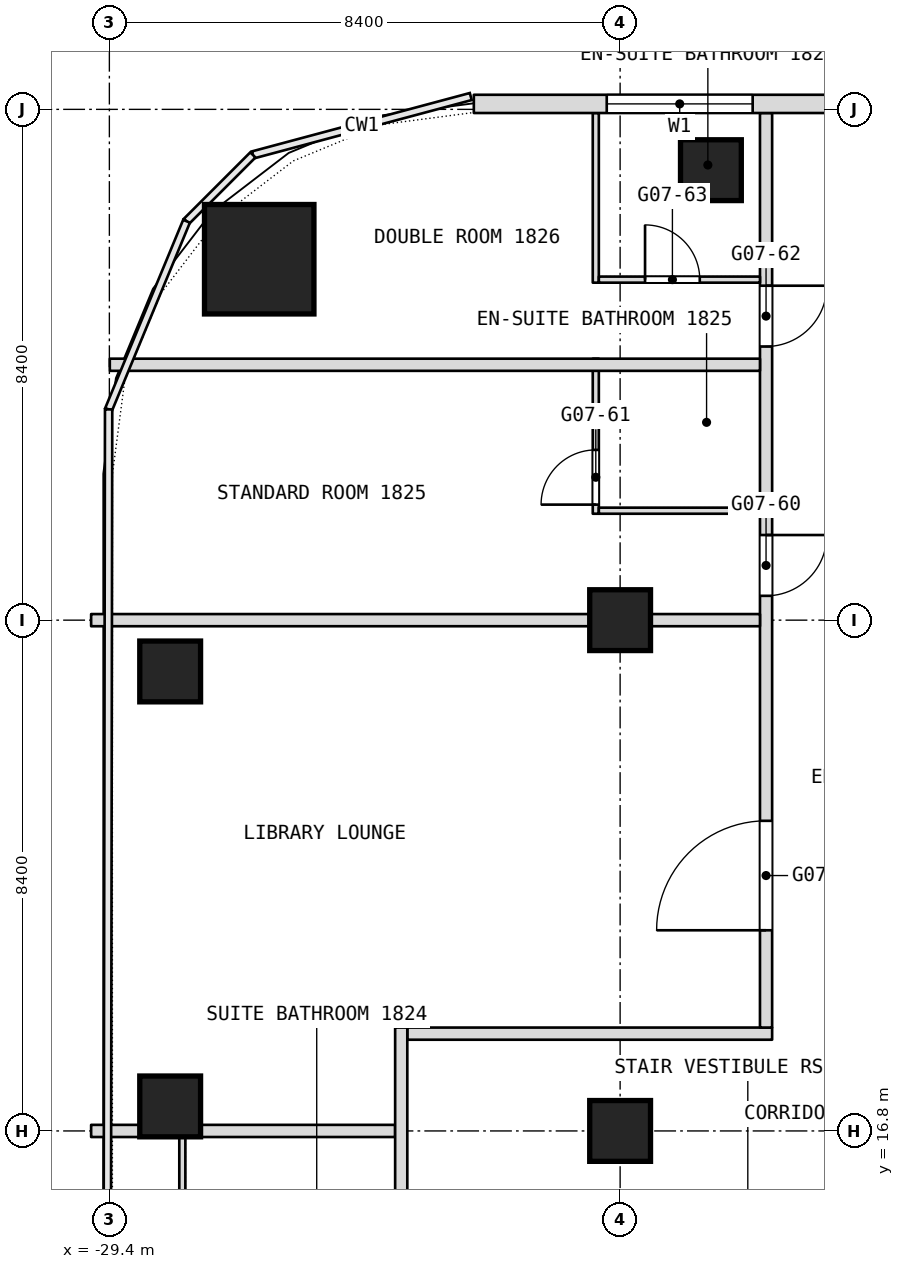
"""IFC4 building model, lengths in metres.
Left out: names, types, materials, properties, quantities, classifications, styles, units other than length and angle.
Written with IfcOpenShell. Run it as: python <this file> out.ifc"""

import sys

from ifc_helpers import new_model, si_unit, direction, frame, frame_2d, origin, origin_2d, place, context, subcontext, project, spatial, rectangle, extrude, element, fill, save


model = new_model("IFC4")
c1 = context("Model", 3, precision=1e-05, world=origin(), true_north=direction((0.0, 1.0)))
c2 = subcontext(c1, "Body", "Model", "MODEL_VIEW")
j1 = project(units=[si_unit("LENGTHUNIT", "METRE"), si_unit("PLANEANGLEUNIT", "RADIAN")], contexts=[c1])
p1 = place(None, origin())
s1 = spatial("IfcSite", under=j1, at=p1, CompositionType="ELEMENT")
p2 = place(p1, origin())
s2 = spatial("IfcBuilding", under=s1, at=p2, CompositionType="ELEMENT")
p3 = place(p2, frame((0.0, 0.0, 79.7)))
s3 = spatial("IfcBuildingStorey", under=s2, at=p3, CompositionType="ELEMENT", Elevation=79.7)
p4 = place(p3, frame((-26.936, 31.135, 0.0), z_axis=(0.0, 0.0, 1.0), x_axis=(1.0, 0.0, 0.0)))
e1 = element("IfcColumn", 1, at=p4, inside=s3, PredefinedType="COLUMN", context=c2, shape_type="SweptSolid", body=[
    extrude(rectangle(XDim=1.8, YDim=1.8, at=origin_2d()), origin(), (0.0, 0.0, 1.0), 3.6),
])
for number, where, z_axis, x_axis in (
    (2, (-21.0, 16.8, 0.0), (0.0, 0.0, 1.0), (1.0, 0.0, 0.0)),
    (3, (-21.0, 25.2, 0.0), (0.0, 0.0, 1.0), (1.0, 0.0, 0.0)),
    (4, (-28.4, 17.203, 0.0), (0.0, 0.0, 1.0), (1.0, 0.0, 0.0)),
    (5, (-28.4, 24.356, 0.0), (0.0, 0.0, 1.0), (1.0, 0.0, 0.0)),
    (6, (-19.507, 32.6, 0.0), (0.0, 0.0, 1.0), (1.0, 0.0, 0.0)),
):
    element("IfcColumn", number, at=place(p3, frame(where, z_axis=z_axis, x_axis=x_axis)), inside=s3, PredefinedType="COLUMN", context=c2, shape_type="SweptSolid", body=[
        extrude(rectangle(XDim=1.0, YDim=1.0, at=origin_2d()), origin(), (0.0, 0.0, 1.0), 3.6),
    ])
p5 = place(p3, frame((-29.7, 16.8, 0.0), z_axis=(0.0, 0.0, 1.0), x_axis=(1.0, 0.0, 0.0)))
e7 = element("IfcWall", 7, at=p5, inside=s3, PredefinedType="PARTITIONING", context=c2, shape_type="SweptSolid", body=[
    extrude(rectangle(XDim=5.0, YDim=0.2, at=frame_2d((2.5, 0.0))), origin(), (0.0, 0.0, 1.0), 2.84),
])
p6 = place(p3, frame((-24.5, 18.4, 0.0), z_axis=(0.0, 0.0, 1.0), x_axis=(1.0, 0.0, 0.0)))
e8 = element("IfcWall", 8, at=p6, inside=s3, PredefinedType="PARTITIONING", context=c2, shape_type="SweptSolid", body=[
    extrude(rectangle(XDim=6.0, YDim=0.2, at=frame_2d((3.0, 0.0))), origin(), (0.0, 0.0, 1.0), 3.34),
])
p7 = place(p3, frame((-18.6, 18.5, 0.0), z_axis=(0.0, 0.0, 1.0), x_axis=(0.0, 1.0, 0.0)))
e9 = element("IfcWall", 9, at=p7, inside=s3, PredefinedType="PARTITIONING", context=c2, shape_type="SweptSolid", body=[
    extrude(rectangle(XDim=15.04, YDim=0.2, at=frame_2d((7.52, 0.0))), origin(), (0.0, 0.0, 1.0), 3.34),
])
p8 = place(p7, frame((1.6, 0.0, 0.0)))
e10 = element("IfcOpeningElement", 10, at=p8, cuts=e9, PredefinedType="OPENING", context=c2, shape_type="SweptSolid", body=[
    extrude(rectangle(XDim=1.8, YDim=2.1, at=frame_2d((0.9, 1.05))), frame((0.0, 0.1, 0.0), z_axis=(0.0, -1.0, 0.0), x_axis=(1.0, 0.0, 0.0)), (0.0, 0.0, 1.0), 0.2),
])
p9 = place(p7, frame((7.1, 0.0, 0.0)))
e11 = element("IfcOpeningElement", 11, at=p9, cuts=e9, PredefinedType="OPENING", context=c2, shape_type="SweptSolid", body=[
    extrude(rectangle(XDim=1.0, YDim=2.1, at=frame_2d((0.5, 1.05))), frame((0.0, 0.1, 0.0), z_axis=(0.0, -1.0, 0.0), x_axis=(1.0, 0.0, 0.0)), (0.0, 0.0, 1.0), 0.2),
])
p10 = place(p7, frame((11.2, 0.0, 0.0)))
e12 = element("IfcOpeningElement", 12, at=p10, cuts=e9, PredefinedType="OPENING", context=c2, shape_type="SweptSolid", body=[
    extrude(rectangle(XDim=1.0, YDim=2.1, at=frame_2d((0.5, 1.05))), frame((0.0, 0.1, 0.0), z_axis=(0.0, -1.0, 0.0), x_axis=(1.0, 0.0, 0.0)), (0.0, 0.0, 1.0), 0.2),
])
p11 = place(p3, frame((-21.4, 26.95, 0.0), z_axis=(0.0, 0.0, 1.0), x_axis=(0.0, 1.0, 0.0)))
e13 = element("IfcWall", 13, at=p11, inside=s3, PredefinedType="PARTITIONING", context=c2, shape_type="SweptSolid", body=[
    extrude(rectangle(XDim=2.55, YDim=0.1, at=frame_2d((1.275, 0.0))), origin(), (0.0, 0.0, 1.0), 3.34),
])
p12 = place(p11, frame((0.15, 0.0, 0.0)))
e14 = element("IfcOpeningElement", 14, at=p12, cuts=e13, PredefinedType="OPENING", context=c2, shape_type="SweptSolid", body=[
    extrude(rectangle(XDim=0.9, YDim=2.1, at=frame_2d((0.45, 1.05))), frame((0.0, 0.05, 0.0), z_axis=(0.0, -1.0, 0.0), x_axis=(1.0, 0.0, 0.0)), (0.0, 0.0, 1.0), 0.1),
])
p13 = place(p3, frame((-21.4, 30.75, 0.0), z_axis=(0.0, 0.0, 1.0), x_axis=(0.0, 1.0, 0.0)))
e15 = element("IfcWall", 15, at=p13, inside=s3, PredefinedType="PARTITIONING", context=c2, shape_type="SweptSolid", body=[
    extrude(rectangle(XDim=2.79, YDim=0.1, at=frame_2d((1.395, 0.0))), origin(), (0.0, 0.0, 1.0), 3.34),
])
p14 = place(p3, frame((-24.6, 6.9, 0.0), z_axis=(0.0, 0.0, 1.0), x_axis=(0.0, 1.0, 0.0)))
e16 = element("IfcWall", 16, at=p14, inside=s3, PredefinedType="PARTITIONING", context=c2, shape_type="SweptSolid", body=[
    extrude(rectangle(XDim=11.6, YDim=0.2, at=frame_2d((5.8, 0.0))), origin(), (0.0, 0.0, 1.0), 3.34),
])
p15 = place(p14, frame((5.1, 0.0, 0.0)))
e17 = element("IfcOpeningElement", 17, at=p15, cuts=e16, PredefinedType="OPENING", context=c2, shape_type="SweptSolid", body=[
    extrude(rectangle(XDim=1.1, YDim=2.1, at=frame_2d((0.55, 1.05))), frame((0.0, 0.1, 0.0), z_axis=(0.0, -1.0, 0.0), x_axis=(1.0, 0.0, 0.0)), (0.0, 0.0, 1.0), 0.2),
])
p16 = place(p3, frame((-29.7, 25.2, 0.0), z_axis=(0.0, 0.0, 1.0), x_axis=(1.0, 0.0, 0.0)))
e18 = element("IfcWall", 18, at=p16, inside=s3, PredefinedType="PARTITIONING", context=c2, shape_type="SweptSolid", body=[
    extrude(rectangle(XDim=11.0, YDim=0.2, at=frame_2d((5.5, 0.0))), origin(), (0.0, 0.0, 1.0), 2.84),
])
p17 = place(p3, frame((-21.35, 27.0, 0.0), z_axis=(0.0, 0.0, 1.0), x_axis=(1.0, 0.0, 0.0)))
e19 = element("IfcWall", 19, at=p17, inside=s3, PredefinedType="PARTITIONING", context=c2, shape_type="SweptSolid", body=[
    extrude(rectangle(XDim=2.65, YDim=0.1, at=frame_2d((1.325, 0.0))), origin(), (0.0, 0.0, 1.0), 3.34),
])
p18 = place(p3, frame((-28.2, 13.15, 0.0), z_axis=(0.0, 0.0, 1.0), x_axis=(0.0, 1.0, 0.0)))
e20 = element("IfcWall", 20, at=p18, inside=s3, PredefinedType="PARTITIONING", context=c2, shape_type="SweptSolid", body=[
    extrude(rectangle(XDim=3.75, YDim=0.1, at=frame_2d((1.875, 0.0))), origin(), (0.0, 0.0, 1.0), 2.94),
])
p19 = place(p3, frame((-29.393, 29.4, 0.0), z_axis=(0.0, 0.0, 1.0), x_axis=(1.0, 0.0, 0.0)))
e21 = element("IfcWall", 21, at=p19, inside=s3, PredefinedType="PARTITIONING", context=c2, shape_type="SweptSolid", body=[
    extrude(rectangle(XDim=10.693, YDim=0.2, at=frame_2d((5.347, 0.0))), origin(), (0.0, 0.0, 1.0), 3.34),
])
p20 = place(p3, frame((-21.35, 30.8, 0.0), z_axis=(0.0, 0.0, 1.0), x_axis=(1.0, 0.0, 0.0)))
e22 = element("IfcWall", 22, at=p20, inside=s3, PredefinedType="PARTITIONING", context=c2, shape_type="SweptSolid", body=[
    extrude(rectangle(XDim=2.65, YDim=0.1, at=frame_2d((1.325, 0.0))), origin(), (0.0, 0.0, 1.0), 3.34),
])
p21 = place(p20, frame((0.76, 0.0, 0.0)))
e23 = element("IfcOpeningElement", 23, at=p21, cuts=e22, PredefinedType="OPENING", context=c2, shape_type="SweptSolid", body=[
    extrude(rectangle(XDim=0.9, YDim=2.1, at=frame_2d((0.45, 1.05))), frame((0.0, 0.05, 0.0), z_axis=(0.0, -1.0, 0.0), x_axis=(1.0, 0.0, 0.0)), (0.0, 0.0, 1.0), 0.1),
])
p22 = place(p3, frame((23.406, 33.69, 0.0), z_axis=(0.0, 0.0, 1.0), x_axis=(-1.0, 0.0, 0.0)))
e24 = element("IfcWall", 24, at=p22, inside=s3, PredefinedType="NOTDEFINED", context=c2, shape_type="SweptSolid", body=[
    extrude(rectangle(XDim=46.812, YDim=0.3, at=frame_2d((23.406, 0.0))), origin(), (0.0, 0.0, 1.0), 3.6),
])
p23 = place(p22, frame((2.186, 0.0, 0.9)))
e25 = element("IfcOpeningElement", 25, at=p23, cuts=e24, PredefinedType="OPENING", context=c2, shape_type="SweptSolid", body=[
    extrude(rectangle(XDim=2.4, YDim=2.1, at=frame_2d((1.2, 1.05))), frame((0.0, 0.15, 0.0), z_axis=(0.0, -1.0, 0.0), x_axis=(1.0, 0.0, 0.0)), (0.0, 0.0, 1.0), 0.3),
])
p24 = place(p22, frame((7.506, 0.0, 0.9)))
e26 = element("IfcOpeningElement", 26, at=p24, cuts=e24, PredefinedType="OPENING", context=c2, shape_type="SweptSolid", body=[
    extrude(rectangle(XDim=2.4, YDim=2.1, at=frame_2d((1.2, 1.05))), frame((0.0, 0.15, 0.0), z_axis=(0.0, -1.0, 0.0), x_axis=(1.0, 0.0, 0.0)), (0.0, 0.0, 1.0), 0.3),
])
p25 = place(p22, frame((11.706, 0.0, 0.9)))
e27 = element("IfcOpeningElement", 27, at=p25, cuts=e24, PredefinedType="OPENING", context=c2, shape_type="SweptSolid", body=[
    extrude(rectangle(XDim=2.4, YDim=2.1, at=frame_2d((1.2, 1.05))), frame((0.0, 0.15, 0.0), z_axis=(0.0, -1.0, 0.0), x_axis=(1.0, 0.0, 0.0)), (0.0, 0.0, 1.0), 0.3),
])
p26 = place(p22, frame((15.906, 0.0, 0.9)))
e28 = element("IfcOpeningElement", 28, at=p26, cuts=e24, PredefinedType="OPENING", context=c2, shape_type="SweptSolid", body=[
    extrude(rectangle(XDim=2.4, YDim=2.1, at=frame_2d((1.2, 1.05))), frame((0.0, 0.15, 0.0), z_axis=(0.0, -1.0, 0.0), x_axis=(1.0, 0.0, 0.0)), (0.0, 0.0, 1.0), 0.3),
])
p27 = place(p22, frame((20.106, 0.0, 0.9)))
e29 = element("IfcOpeningElement", 29, at=p27, cuts=e24, PredefinedType="OPENING", context=c2, shape_type="SweptSolid", body=[
    extrude(rectangle(XDim=2.4, YDim=2.1, at=frame_2d((1.2, 1.05))), frame((0.0, 0.15, 0.0), z_axis=(0.0, -1.0, 0.0), x_axis=(1.0, 0.0, 0.0)), (0.0, 0.0, 1.0), 0.3),
])
p28 = place(p22, frame((24.306, 0.0, 0.9)))
e30 = element("IfcOpeningElement", 30, at=p28, cuts=e24, PredefinedType="OPENING", context=c2, shape_type="SweptSolid", body=[
    extrude(rectangle(XDim=2.4, YDim=2.1, at=frame_2d((1.2, 1.05))), frame((0.0, 0.15, 0.0), z_axis=(0.0, -1.0, 0.0), x_axis=(1.0, 0.0, 0.0)), (0.0, 0.0, 1.0), 0.3),
])
p29 = place(p22, frame((28.506, 0.0, 0.9)))
e31 = element("IfcOpeningElement", 31, at=p29, cuts=e24, PredefinedType="OPENING", context=c2, shape_type="SweptSolid", body=[
    extrude(rectangle(XDim=2.4, YDim=2.1, at=frame_2d((1.2, 1.05))), frame((0.0, 0.15, 0.0), z_axis=(0.0, -1.0, 0.0), x_axis=(1.0, 0.0, 0.0)), (0.0, 0.0, 1.0), 0.3),
])
p30 = place(p22, frame((32.706, 0.0, 0.9)))
e32 = element("IfcOpeningElement", 32, at=p30, cuts=e24, PredefinedType="OPENING", context=c2, shape_type="SweptSolid", body=[
    extrude(rectangle(XDim=2.4, YDim=2.1, at=frame_2d((1.2, 1.05))), frame((0.0, 0.15, 0.0), z_axis=(0.0, -1.0, 0.0), x_axis=(1.0, 0.0, 0.0)), (0.0, 0.0, 1.0), 0.3),
])
p31 = place(p22, frame((36.906, 0.0, 0.9)))
e33 = element("IfcOpeningElement", 33, at=p31, cuts=e24, PredefinedType="OPENING", context=c2, shape_type="SweptSolid", body=[
    extrude(rectangle(XDim=2.4, YDim=2.1, at=frame_2d((1.2, 1.05))), frame((0.0, 0.15, 0.0), z_axis=(0.0, -1.0, 0.0), x_axis=(1.0, 0.0, 0.0)), (0.0, 0.0, 1.0), 0.3),
])
p32 = place(p22, frame((42.226, 0.0, 0.9)))
e34 = element("IfcOpeningElement", 34, at=p32, cuts=e24, PredefinedType="OPENING", context=c2, shape_type="SweptSolid", body=[
    extrude(rectangle(XDim=2.4, YDim=2.1, at=frame_2d((1.2, 1.05))), frame((0.0, 0.15, 0.0), z_axis=(0.0, -1.0, 0.0), x_axis=(1.0, 0.0, 0.0)), (0.0, 0.0, 1.0), 0.3),
])
p33 = place(p8, origin())
e35 = element("IfcDoor", 35, at=p33, inside=s3, OperationType="DOUBLE_DOOR_SINGLE_SWING", PredefinedType="DOOR", context=c2, shape_type="SweptSolid", body=[
    extrude(rectangle(XDim=1.8, YDim=2.1, at=frame_2d((0.9, 1.05))), frame((0.0, 0.025, 0.0), z_axis=(0.0, -1.0, 0.0), x_axis=(1.0, 0.0, 0.0)), (0.0, 0.0, 1.0), 0.05),
])
fill(e10, e35)
p34 = place(p9, origin())
e36 = element("IfcDoor", 36, at=p34, inside=s3, OperationType="SINGLE_SWING_LEFT", PredefinedType="DOOR", context=c2, shape_type="SweptSolid", body=[
    extrude(rectangle(XDim=1.0, YDim=2.1, at=frame_2d((0.5, 1.05))), frame((0.0, 0.025, 0.0), z_axis=(0.0, -1.0, 0.0), x_axis=(1.0, 0.0, 0.0)), (0.0, 0.0, 1.0), 0.05),
])
fill(e11, e36)
p35 = place(p10, origin())
e37 = element("IfcDoor", 37, at=p35, inside=s3, OperationType="SINGLE_SWING_RIGHT", PredefinedType="DOOR", context=c2, shape_type="SweptSolid", body=[
    extrude(rectangle(XDim=1.0, YDim=2.1, at=frame_2d((0.5, 1.05))), frame((0.0, 0.025, 0.0), z_axis=(0.0, -1.0, 0.0), x_axis=(1.0, 0.0, 0.0)), (0.0, 0.0, 1.0), 0.05),
])
fill(e12, e37)
p36 = place(p12, origin())
e38 = element("IfcDoor", 38, at=p36, inside=s3, OperationType="SINGLE_SWING_RIGHT", PredefinedType="DOOR", context=c2, shape_type="SweptSolid", body=[
    extrude(rectangle(XDim=0.9, YDim=2.1, at=frame_2d((0.45, 1.05))), frame((0.0, 0.025, 0.0), z_axis=(0.0, -1.0, 0.0), x_axis=(1.0, 0.0, 0.0)), (0.0, 0.0, 1.0), 0.05),
])
fill(e14, e38)
p37 = place(p21, origin())
e39 = element("IfcDoor", 39, at=p37, inside=s3, OperationType="SINGLE_SWING_LEFT", PredefinedType="DOOR", context=c2, shape_type="SweptSolid", body=[
    extrude(rectangle(XDim=0.9, YDim=2.1, at=frame_2d((0.45, 1.05))), frame((0.0, 0.025, 0.0), z_axis=(0.0, -1.0, 0.0), x_axis=(1.0, 0.0, 0.0)), (0.0, 0.0, 1.0), 0.05),
])
fill(e23, e39)
p38 = place(p32, origin())
e40 = element("IfcWindow", 40, at=p38, inside=s3, PartitioningType="SINGLE_PANEL", PredefinedType="WINDOW", context=c2, shape_type="SweptSolid", body=[
    extrude(rectangle(XDim=2.4, YDim=2.1, at=frame_2d((1.2, 1.05))), frame((0.0, 0.03, 0.0), z_axis=(0.0, -1.0, 0.0), x_axis=(1.0, 0.0, 0.0)), (0.0, 0.0, 1.0), 0.06),
])
fill(e34, e40)
save(model, sys.argv[1])
